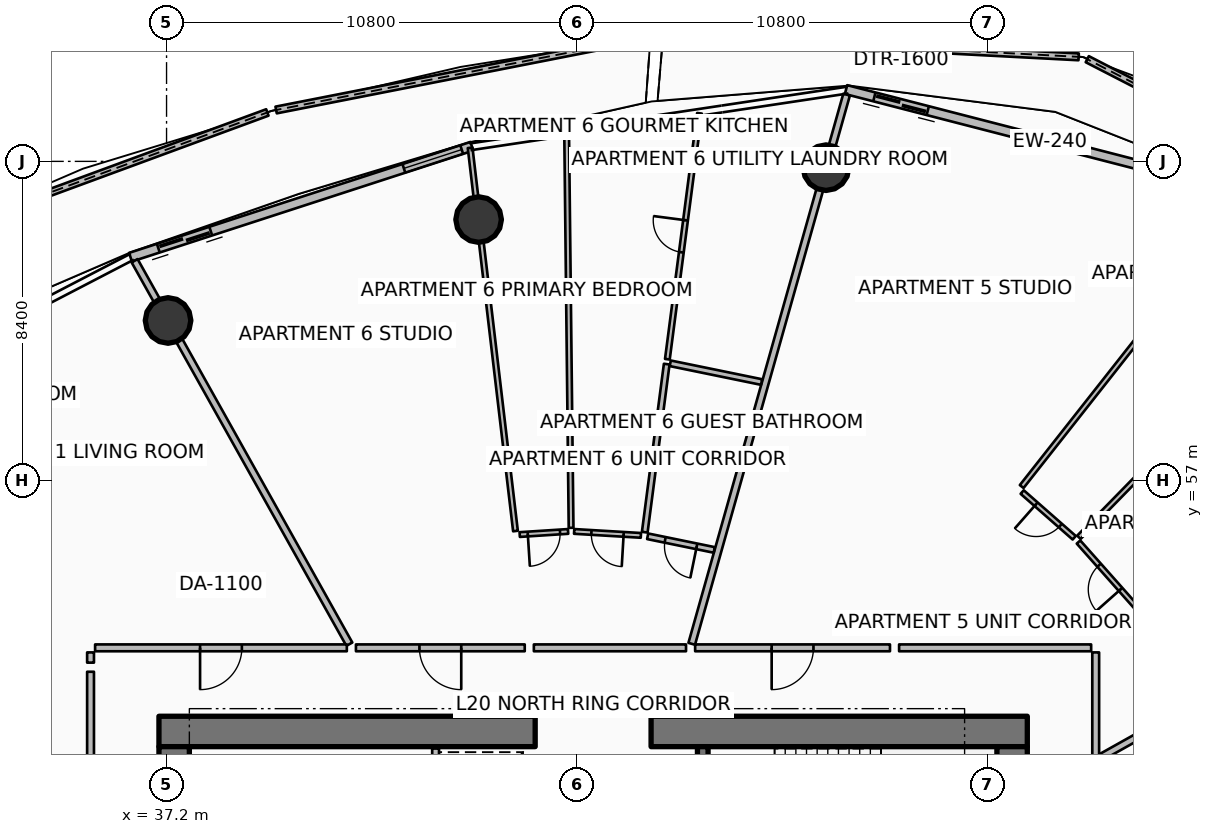
"""IFC4 building model, lengths in metres.
Left out: names, types, materials, properties, quantities, classifications, styles, units other than length and angle.
Written with IfcOpenShell. Run it as: python <this file> out.ifc"""

import sys

from ifc_helpers import new_model, si_unit, direction, frame, frame_2d, origin, origin_2d, place, context, subcontext, project, spatial, polyline, rectangle, circle, outline, extrude, element, fill, save


model = new_model("IFC4")
c1 = context("Model", 3, precision=1e-05, world=origin(), true_north=direction((0.0, 1.0)))
c2 = subcontext(c1, "Body", "Model", "MODEL_VIEW")
j1 = project(units=[si_unit("LENGTHUNIT", "METRE"), si_unit("PLANEANGLEUNIT", "RADIAN")], contexts=[c1])
p1 = place(None, origin())
s1 = spatial("IfcSite", under=j1, at=p1, CompositionType="ELEMENT")
p2 = place(p1, origin())
s2 = spatial("IfcBuilding", under=s1, at=p2, CompositionType="ELEMENT")
p3 = place(p2, frame((0.0, 0.0, 82.65)))
s3 = spatial("IfcBuildingStorey", under=s2, at=p3, CompositionType="ELEMENT", Elevation=82.65)
p4 = place(p3, frame((37.0, 50.4, 0.0), z_axis=(0.0, 0.0, 1.0), x_axis=(1.0, 0.0, 0.0)))
e1 = element("IfcWall", 1, at=p4, inside=s3, PredefinedType="SHEAR", context=c2, shape_type="SweptSolid", body=[
    extrude(rectangle(XDim=9.9, YDim=0.8, at=frame_2d((4.95, 0.0))), origin(), (0.0, 0.0, 1.0), 3.75),
])
p5 = place(p3, frame((49.95, 50.4, 0.0), z_axis=(0.0, 0.0, 1.0), x_axis=(1.0, 0.0, 0.0)))
e2 = element("IfcWall", 2, at=p5, inside=s3, PredefinedType="SHEAR", context=c2, shape_type="SweptSolid", body=[
    extrude(rectangle(XDim=9.9, YDim=0.8, at=frame_2d((4.95, 0.0))), origin(), (0.0, 0.0, 1.0), 3.75),
])
for number, where, z_axis, x_axis in (
    (3, (37.4, 34.0, 0.0), (0.0, 0.0, 1.0), (0.0, 1.0, 0.0)),
    (4, (59.45, 34.0, 0.0), (0.0, 0.0, 1.0), (0.0, 1.0, 0.0)),
):
    element("IfcWall", number, at=place(p3, frame(where, z_axis=z_axis, x_axis=x_axis)), inside=s3, PredefinedType="SHEAR", context=c2, shape_type="SweptSolid", body=[
        extrude(rectangle(XDim=16.0, YDim=0.8, at=frame_2d((8.0, 0.0))), origin(), (0.0, 0.0, 1.0), 3.75),
    ])
p6 = place(p3, frame((51.31, 46.5, 0.0), z_axis=(0.0, 0.0, 1.0), x_axis=(0.0, 1.0, 0.0)))
e5 = element("IfcWall", 5, at=p6, inside=s3, PredefinedType="SHEAR", context=c2, shape_type="SweptSolid", body=[
    extrude(rectangle(XDim=3.5, YDim=0.28, at=frame_2d((1.75, 0.0))), origin(), (0.0, 0.0, 1.0), 3.75),
])
for number, where, z_axis, x_axis in (
    (6, (54.553, 65.234, 0.0), (0.0, 0.0, 1.0), (1.0, 0.0, 0.0)),
    (7, (45.412, 63.869, 0.0), (0.0, 0.0, 1.0), (1.0, 0.0, 0.0)),
    (8, (37.24, 61.214, 0.0), (0.0, 0.0, 1.0), (1.0, 0.0, 0.0)),
):
    element("IfcColumn", number, at=place(p3, frame(where, z_axis=z_axis, x_axis=x_axis)), inside=s3, PredefinedType="COLUMN", context=c2, shape_type="SweptSolid", body=[
        extrude(circle(Radius=0.6, at=origin_2d()), origin(), (0.0, 0.0, 1.0), 3.5),
    ])
p7 = place(p3, frame((71.92, 62.684, 0.0), z_axis=(0.0, 0.0, 1.0), x_axis=(-0.888984508261, 0.457937270892, 0.0)))
e9 = element("IfcWall", 9, at=p7, inside=s3, PredefinedType="PARAPET", context=c2, shape_type="SweptSolid", body=[
    extrude(outline(polyline([(0.0, 0.0), (11.803, 0.0), (11.803, 1.148), (5.902, 1.284), (0.0, 1.483), (0.0, 0.0)])), frame((0.0, 0.09, 0.0), z_axis=(0.0, -1.0, 0.0), x_axis=(1.0, 0.0, 0.0)), (0.0, 0.0, 1.0), 0.18),
])
p8 = place(p3, frame((61.201, 68.15, 0.0), z_axis=(0.0, 0.0, 1.0), x_axis=(-0.998637836961, 0.052177299569, 0.0)))
e10 = element("IfcWall", 10, at=p8, inside=s3, PredefinedType="PARAPET", context=c2, shape_type="SweptSolid", body=[
    extrude(outline(polyline([(0.0, 0.0), (10.949, 0.0), (10.949, 1.224), (5.474, 1.127), (0.0, 1.148), (0.0, 0.0)])), frame((0.0, 0.09, 0.0), z_axis=(0.0, -1.0, 0.0), x_axis=(1.0, 0.0, 0.0)), (0.0, 0.0, 1.0), 0.18),
])
p9 = place(p3, frame((49.936, 68.686, 0.0), z_axis=(0.0, 0.0, 1.0), x_axis=(-0.98127943736, -0.192589370979, 0.0)))
e11 = element("IfcWall", 11, at=p9, inside=s3, PredefinedType="PARAPET", context=c2, shape_type="SweptSolid", body=[
    extrude(outline(polyline([(0.0, 0.0), (10.041, 0.0), (10.041, 1.632), (5.021, 1.418), (0.0, 1.233), (0.0, 0.0)])), frame((0.0, 0.09, 0.0), z_axis=(0.0, -1.0, 0.0), x_axis=(1.0, 0.0, 0.0)), (0.0, 0.0, 1.0), 0.18),
])
p10 = place(p3, frame((39.853, 66.687, 0.0), z_axis=(0.0, 0.0, 1.0), x_axis=(-0.938356460989, -0.345669136777, 0.0)))
e12 = element("IfcWall", 12, at=p10, inside=s3, PredefinedType="PARAPET", context=c2, shape_type="SweptSolid", body=[
    extrude(outline(polyline([(0.0, 0.0), (10.308, 0.0), (10.308, 1.86), (5.154, 1.798), (0.0, 1.632), (0.0, 0.0)])), frame((0.0, 0.09, 0.0), z_axis=(0.0, -1.0, 0.0), x_axis=(1.0, 0.0, 0.0)), (0.0, 0.0, 1.0), 0.18),
])
p11 = place(p3, frame((65.814, 64.523, 0.0), z_axis=(0.0, 0.0, 1.0), x_axis=(-0.968356180858, 0.249572248045, 0.0)))
e13 = element("IfcWall", 13, at=p11, inside=s3, PredefinedType="SOLIDWALL", context=c2, shape_type="SweptSolid", body=[
    extrude(rectangle(XDim=11.084, YDim=0.24, at=frame_2d((5.542, 0.0))), origin(), (0.0, 0.0, 1.0), 2.45),
])
p12 = place(p11, frame((8.865, 0.0, 0.0)))
e14 = element("IfcOpeningElement", 14, at=p12, cuts=e13, PredefinedType="OPENING", context=c2, shape_type="SweptSolid", body=[
    extrude(rectangle(XDim=1.45, YDim=2.15, at=frame_2d((0.725, 1.075))), frame((0.0, 0.13, 0.0), z_axis=(0.0, -1.0, 0.0), x_axis=(1.0, 0.0, 0.0)), (0.0, 0.0, 1.0), 0.26),
])
p13 = place(p11, frame((0.28, 0.0, 0.65)))
e15 = element("IfcOpeningElement", 15, at=p13, cuts=e13, PredefinedType="OPENING", context=c2, shape_type="SweptSolid", body=[
    extrude(rectangle(XDim=1.6, YDim=1.5, at=frame_2d((0.8, 0.75))), frame((0.0, 0.13, 0.0), z_axis=(0.0, -1.0, 0.0), x_axis=(1.0, 0.0, 0.0)), (0.0, 0.0, 1.0), 0.26),
])
p14 = place(p3, frame((45.233, 65.797, 0.0), z_axis=(0.0, 0.0, 1.0), x_axis=(-0.951052494852, -0.30902937083, 0.0)))
e16 = element("IfcWall", 16, at=p14, inside=s3, PredefinedType="SOLIDWALL", context=c2, shape_type="SweptSolid", body=[
    extrude(rectangle(XDim=9.444, YDim=0.24, at=frame_2d((4.722, 0.0))), origin(), (0.0, 0.0, 1.0), 2.45),
])
p15 = place(p14, frame((7.224, 0.0, 0.0)))
e17 = element("IfcOpeningElement", 17, at=p15, cuts=e16, PredefinedType="OPENING", context=c2, shape_type="SweptSolid", body=[
    extrude(rectangle(XDim=1.45, YDim=2.15, at=frame_2d((0.725, 1.075))), frame((0.0, 0.13, 0.0), z_axis=(0.0, -1.0, 0.0), x_axis=(1.0, 0.0, 0.0)), (0.0, 0.0, 1.0), 0.26),
])
p16 = place(p14, frame((0.28, 0.0, 0.65)))
e18 = element("IfcOpeningElement", 18, at=p16, cuts=e16, PredefinedType="OPENING", context=c2, shape_type="SweptSolid", body=[
    extrude(rectangle(XDim=1.6, YDim=1.5, at=frame_2d((0.8, 0.75))), frame((0.0, 0.13, 0.0), z_axis=(0.0, -1.0, 0.0), x_axis=(1.0, 0.0, 0.0)), (0.0, 0.0, 1.0), 0.26),
])
p17 = place(p3, frame((44.28, 47.82, 0.0), z_axis=(0.0, 0.0, 1.0), x_axis=(0.0, 1.0, 0.0)))
e19 = element("IfcWall", 19, at=p17, inside=s3, PredefinedType="PARTITIONING", context=c2, shape_type="SweptSolid", body=[
    extrude(rectangle(XDim=2.13, YDim=0.18, at=frame_2d((1.065, 0.0))), origin(), (0.0, 0.0, 1.0), 3.5),
])
p18 = place(p3, frame((61.746, 49.698, 0.0), z_axis=(0.0, 0.0, 1.0), x_axis=(0.872489938668, 0.488632077256, 0.0)))
e20 = element("IfcWall", 20, at=p18, inside=s3, PredefinedType="PARTITIONING", context=c2, shape_type="SweptSolid", body=[
    extrude(rectangle(XDim=13.725, YDim=0.18, at=frame_2d((6.862, 0.0))), origin(), (0.0, 0.0, 1.0), 2.94),
])
p19 = place(p3, frame((51.019, 52.706, 0.0), z_axis=(0.0, 0.0, 1.0), x_axis=(0.271450895995, 0.962452290279, 0.0)))
e21 = element("IfcWall", 21, at=p19, inside=s3, PredefinedType="PARTITIONING", context=c2, shape_type="SweptSolid", body=[
    extrude(rectangle(XDim=15.014, YDim=0.18, at=frame_2d((7.507, 0.0))), origin(), (0.0, 0.0, 1.0), 2.94),
])
p20 = place(p3, frame((42.01, 52.696, 0.0), z_axis=(0.0, 0.0, 1.0), x_axis=(-0.488628442553, 0.872491974249, 0.0)))
e22 = element("IfcWall", 22, at=p20, inside=s3, PredefinedType="PARTITIONING", context=c2, shape_type="SweptSolid", body=[
    extrude(rectangle(XDim=11.563, YDim=0.18, at=frame_2d((5.782, 0.0))), origin(), (0.0, 0.0, 1.0), 2.94),
])
p21 = place(p3, frame((41.944, 52.6, 0.0), z_axis=(0.0, 0.0, 1.0), x_axis=(-1.0, 0.0, 0.0)))
e23 = element("IfcWall", 23, at=p21, inside=s3, PredefinedType="PARTITIONING", context=c2, shape_type="SweptSolid", body=[
    extrude(rectangle(XDim=6.624, YDim=0.18, at=frame_2d((3.312, 0.0))), origin(), (0.0, 0.0, 1.0), 2.94),
])
p22 = place(p21, frame((2.762, 0.0, 0.0)))
e24 = element("IfcOpeningElement", 24, at=p22, cuts=e23, PredefinedType="OPENING", context=c2, shape_type="SweptSolid", body=[
    extrude(rectangle(XDim=1.1, YDim=2.1, at=frame_2d((0.55, 1.05))), frame((0.0, 0.1, 0.0), z_axis=(0.0, -1.0, 0.0), x_axis=(1.0, 0.0, 0.0)), (0.0, 0.0, 1.0), 0.2),
])
p23 = place(p3, frame((35.2, 52.48, 0.0), z_axis=(0.0, 0.0, 1.0), x_axis=(0.0, -1.0, 0.0)))
e25 = element("IfcWall", 25, at=p23, inside=s3, PredefinedType="PARTITIONING", context=c2, shape_type="SweptSolid", body=[
    extrude(rectangle(XDim=0.269, YDim=0.18, at=frame_2d((0.135, 0.0))), origin(), (0.0, 0.0, 1.0), 2.94),
])
p24 = place(p3, frame((35.2, 51.971, 0.0), z_axis=(0.0, 0.0, 1.0), x_axis=(0.0, -1.0, 0.0)))
e26 = element("IfcWall", 26, at=p24, inside=s3, PredefinedType="PARTITIONING", context=c2, shape_type="SweptSolid", body=[
    extrude(rectangle(XDim=6.241, YDim=0.18, at=frame_2d((3.12, 0.0))), origin(), (0.0, 0.0, 1.0), 2.94),
])
p25 = place(p3, frame((56.236, 52.6, 0.0), z_axis=(0.0, 0.0, 1.0), x_axis=(-1.0, 0.0, 0.0)))
e27 = element("IfcWall", 27, at=p25, inside=s3, PredefinedType="PARTITIONING", context=c2, shape_type="SweptSolid", body=[
    extrude(rectangle(XDim=5.127, YDim=0.18, at=frame_2d((2.563, 0.0))), origin(), (0.0, 0.0, 1.0), 2.94),
])
p26 = place(p25, frame((2.013, 0.0, 0.0)))
e28 = element("IfcOpeningElement", 28, at=p26, cuts=e27, PredefinedType="OPENING", context=c2, shape_type="SweptSolid", body=[
    extrude(rectangle(XDim=1.1, YDim=2.1, at=frame_2d((0.55, 1.05))), frame((0.0, 0.1, 0.0), z_axis=(0.0, -1.0, 0.0), x_axis=(1.0, 0.0, 0.0)), (0.0, 0.0, 1.0), 0.2),
])
p27 = place(p3, frame((61.65, 49.764, 0.0), z_axis=(0.0, 0.0, 1.0), x_axis=(0.0, 1.0, 0.0)))
e29 = element("IfcWall", 29, at=p27, inside=s3, PredefinedType="PARTITIONING", context=c2, shape_type="SweptSolid", body=[
    extrude(rectangle(XDim=2.716, YDim=0.18, at=frame_2d((1.358, 0.0))), origin(), (0.0, 0.0, 1.0), 2.94),
])
p28 = place(p3, frame((61.53, 52.6, 0.0), z_axis=(0.0, 0.0, 1.0), x_axis=(-1.0, 0.0, 0.0)))
e30 = element("IfcWall", 30, at=p28, inside=s3, PredefinedType="PARTITIONING", context=c2, shape_type="SweptSolid", body=[
    extrude(rectangle(XDim=5.054, YDim=0.18, at=frame_2d((2.527, 0.0))), origin(), (0.0, 0.0, 1.0), 2.94),
])
p29 = place(p3, frame((59.702, 56.844, 0.0), z_axis=(0.0, 0.0, 1.0), x_axis=(0.619083405129, 0.785325243128, 0.0)))
e31 = element("IfcWall", 31, at=p29, inside=s3, PredefinedType="PARTITIONING", context=c2, shape_type="SweptSolid", body=[
    extrude(rectangle(XDim=9.769, YDim=0.125, at=frame_2d((4.885, 0.0))), origin(), (0.0, 0.0, 1.0), 2.94),
])
p30 = place(p3, frame((61.208, 55.508, 0.0), z_axis=(0.0, 0.0, 1.0), x_axis=(0.699096858951, 0.715026979774, 0.0)))
e32 = element("IfcWall", 32, at=p30, inside=s3, PredefinedType="PARTITIONING", context=c2, shape_type="SweptSolid", body=[
    extrude(rectangle(XDim=9.747, YDim=0.125, at=frame_2d((4.874, 0.0))), origin(), (0.0, 0.0, 1.0), 2.94),
])
p31 = place(p3, frame((62.846, 53.527, 0.0), z_axis=(0.0, 0.0, 1.0), x_axis=(-0.663881646848, 0.747837655497, 0.0)))
e33 = element("IfcWall", 33, at=p31, inside=s3, PredefinedType="PARTITIONING", context=c2, shape_type="SweptSolid", body=[
    extrude(rectangle(XDim=2.483, YDim=0.125, at=frame_2d((1.242, 0.0))), origin(), (0.0, 0.0, 1.0), 2.94),
])
p32 = place(p31, frame((0.817, 0.0, 0.0)))
e34 = element("IfcOpeningElement", 34, at=p32, cuts=e33, PredefinedType="OPENING", context=c2, shape_type="SweptSolid", body=[
    extrude(rectangle(XDim=0.85, YDim=2.06, at=frame_2d((0.425, 1.03))), frame((0.0, 0.073, 0.0), z_axis=(0.0, -1.0, 0.0), x_axis=(1.0, 0.0, 0.0)), (0.0, 0.0, 1.0), 0.145),
])
p33 = place(p3, frame((61.084, 55.497, 0.0), z_axis=(0.0, 0.0, 1.0), x_axis=(-0.75124742024, 0.660020691784, 0.0)))
e35 = element("IfcWall", 35, at=p33, inside=s3, PredefinedType="PARTITIONING", context=c2, shape_type="SweptSolid", body=[
    extrude(rectangle(XDim=1.823, YDim=0.125, at=frame_2d((0.911, 0.0))), origin(), (0.0, 0.0, 1.0), 2.94),
])
p34 = place(p33, frame((0.486, 0.0, 0.0)))
e36 = element("IfcOpeningElement", 36, at=p34, cuts=e35, PredefinedType="OPENING", context=c2, shape_type="SweptSolid", body=[
    extrude(rectangle(XDim=0.85, YDim=2.06, at=frame_2d((0.425, 1.03))), frame((0.0, 0.073, 0.0), z_axis=(0.0, -1.0, 0.0), x_axis=(1.0, 0.0, 0.0)), (0.0, 0.0, 1.0), 0.145),
])
p35 = place(p3, frame((46.625, 52.6, 0.0), z_axis=(0.0, 0.0, 1.0), x_axis=(-1.0, 0.0, 0.0)))
e37 = element("IfcWall", 37, at=p35, inside=s3, PredefinedType="PARTITIONING", context=c2, shape_type="SweptSolid", body=[
    extrude(rectangle(XDim=4.442, YDim=0.18, at=frame_2d((2.221, 0.0))), origin(), (0.0, 0.0, 1.0), 2.94),
])
p36 = place(p35, frame((1.671, 0.0, 0.0)))
e38 = element("IfcOpeningElement", 38, at=p36, cuts=e37, PredefinedType="OPENING", context=c2, shape_type="SweptSolid", body=[
    extrude(rectangle(XDim=1.1, YDim=2.1, at=frame_2d((0.55, 1.05))), frame((0.0, 0.1, 0.0), z_axis=(0.0, -1.0, 0.0), x_axis=(1.0, 0.0, 0.0)), (0.0, 0.0, 1.0), 0.2),
])
p37 = place(p3, frame((50.869, 52.6, 0.0), z_axis=(0.0, 0.0, 1.0), x_axis=(-1.0, 0.0, 0.0)))
e39 = element("IfcWall", 39, at=p37, inside=s3, PredefinedType="PARTITIONING", context=c2, shape_type="SweptSolid", body=[
    extrude(rectangle(XDim=4.004, YDim=0.18, at=frame_2d((2.002, 0.0))), origin(), (0.0, 0.0, 1.0), 2.94),
])
p38 = place(p3, frame((46.382, 55.674, 0.0), z_axis=(0.0, 0.0, 1.0), x_axis=(-0.117533197276, 0.99306895407, 0.0)))
e40 = element("IfcWall", 40, at=p38, inside=s3, PredefinedType="PARTITIONING", context=c2, shape_type="SweptSolid", body=[
    extrude(rectangle(XDim=10.153, YDim=0.125, at=frame_2d((5.077, 0.0))), origin(), (0.0, 0.0, 1.0), 2.94),
])
p39 = place(p3, frame((51.612, 55.176, 0.0), z_axis=(0.0, 0.0, 1.0), x_axis=(-0.979559973395, 0.201152326663, 0.0)))
e41 = element("IfcWall", 41, at=p39, inside=s3, PredefinedType="PARTITIONING", context=c2, shape_type="SweptSolid", body=[
    extrude(rectangle(XDim=1.789, YDim=0.15, at=frame_2d((0.895, 0.0))), origin(), (0.0, 0.0, 1.0), 2.94),
])
p40 = place(p39, frame((0.469, 0.0, 0.0)))
e42 = element("IfcOpeningElement", 42, at=p40, cuts=e41, PredefinedType="OPENING", context=c2, shape_type="SweptSolid", body=[
    extrude(rectangle(XDim=0.85, YDim=2.06, at=frame_2d((0.425, 1.03))), frame((0.0, 0.085, 0.0), z_axis=(0.0, -1.0, 0.0), x_axis=(1.0, 0.0, 0.0)), (0.0, 0.0, 1.0), 0.17),
])
p41 = place(p3, frame((52.858, 59.594, 0.0), z_axis=(0.0, 0.0, 1.0), x_axis=(-0.979569035828, 0.201108189903, 0.0)))
e43 = element("IfcWall", 43, at=p41, inside=s3, PredefinedType="PARTITIONING", context=c2, shape_type="SweptSolid", body=[
    extrude(rectangle(XDim=2.453, YDim=0.15, at=frame_2d((1.227, 0.0))), origin(), (0.0, 0.0, 1.0), 2.94),
])
p42 = place(p3, frame((49.783, 55.643, 0.0), z_axis=(0.0, 0.0, 1.0), x_axis=(0.129624682181, 0.991563130501, 0.0)))
e44 = element("IfcWall", 44, at=p42, inside=s3, PredefinedType="PARTITIONING", context=c2, shape_type="SweptSolid", body=[
    extrude(rectangle(XDim=4.46, YDim=0.15, at=frame_2d((2.23, 0.0))), origin(), (0.0, 0.0, 1.0), 2.94),
])
p43 = place(p3, frame((50.378, 60.194, 0.0), z_axis=(0.0, 0.0, 1.0), x_axis=(0.129622249643, 0.991563448498, 0.0)))
e45 = element("IfcWall", 45, at=p43, inside=s3, PredefinedType="PARTITIONING", context=c2, shape_type="SweptSolid", body=[
    extrude(rectangle(XDim=6.526, YDim=0.125, at=frame_2d((3.263, 0.0))), origin(), (0.0, 0.0, 1.0), 2.94),
])
p44 = place(p43, frame((2.838, 0.0, 0.0)))
e46 = element("IfcOpeningElement", 46, at=p44, cuts=e45, PredefinedType="OPENING", context=c2, shape_type="SweptSolid", body=[
    extrude(rectangle(XDim=0.85, YDim=2.06, at=frame_2d((0.425, 1.03))), frame((0.0, 0.073, 0.0), z_axis=(0.0, -1.0, 0.0), x_axis=(1.0, 0.0, 0.0)), (0.0, 0.0, 1.0), 0.145),
])
p45 = place(p3, frame((47.845, 55.758, 0.0), z_axis=(0.0, 0.0, 1.0), x_axis=(-0.011264572172, 0.999936552694, 0.0)))
e47 = element("IfcWall", 47, at=p45, inside=s3, PredefinedType="PARTITIONING", context=c2, shape_type="SweptSolid", body=[
    extrude(rectangle(XDim=10.382, YDim=0.125, at=frame_2d((5.191, 0.0))), origin(), (0.0, 0.0, 1.0), 2.94),
])
p46 = place(p3, frame((49.682, 55.559, 0.0), z_axis=(0.0, 0.0, 1.0), x_axis=(-0.99824215698, 0.059267158097, 0.0)))
e48 = element("IfcWall", 48, at=p46, inside=s3, PredefinedType="PARTITIONING", context=c2, shape_type="SweptSolid", body=[
    extrude(rectangle(XDim=1.759, YDim=0.125, at=frame_2d((0.879, 0.0))), origin(), (0.0, 0.0, 1.0), 2.94),
])
p47 = place(p46, frame((0.455, 0.0, 0.0)))
e49 = element("IfcOpeningElement", 49, at=p47, cuts=e48, PredefinedType="OPENING", context=c2, shape_type="SweptSolid", body=[
    extrude(rectangle(XDim=0.85, YDim=2.06, at=frame_2d((0.425, 1.03))), frame((0.0, 0.073, 0.0), z_axis=(0.0, -1.0, 0.0), x_axis=(1.0, 0.0, 0.0)), (0.0, 0.0, 1.0), 0.145),
])
p48 = place(p3, frame((47.766, 55.663, 0.0), z_axis=(0.0, 0.0, 1.0), x_axis=(-0.997930857608, -0.064296216329, 0.0)))
e50 = element("IfcWall", 50, at=p48, inside=s3, PredefinedType="PARTITIONING", context=c2, shape_type="SweptSolid", body=[
    extrude(rectangle(XDim=1.276, YDim=0.125, at=frame_2d((0.638, 0.0))), origin(), (0.0, 0.0, 1.0), 2.94),
])
p49 = place(p48, frame((0.213, 0.0, 0.0)))
e51 = element("IfcOpeningElement", 51, at=p49, cuts=e50, PredefinedType="OPENING", context=c2, shape_type="SweptSolid", body=[
    extrude(rectangle(XDim=0.85, YDim=2.06, at=frame_2d((0.425, 1.03))), frame((0.0, 0.073, 0.0), z_axis=(0.0, -1.0, 0.0), x_axis=(1.0, 0.0, 0.0)), (0.0, 0.0, 1.0), 0.145),
])
p50 = place(p12, origin())
e52 = element("IfcDoor", 52, at=p50, inside=s3, OperationType="DOUBLE_DOOR_SLIDING", PredefinedType="DOOR", context=c2, shape_type="SweptSolid", body=[
    extrude(rectangle(XDim=1.45, YDim=2.15, at=frame_2d((0.725, 1.075))), frame((0.0, 0.025, 0.0), z_axis=(0.0, -1.0, 0.0), x_axis=(1.0, 0.0, 0.0)), (0.0, 0.0, 1.0), 0.05),
])
fill(e14, e52)
p51 = place(p15, origin())
e53 = element("IfcDoor", 53, at=p51, inside=s3, OperationType="DOUBLE_DOOR_SLIDING", PredefinedType="DOOR", context=c2, shape_type="SweptSolid", body=[
    extrude(rectangle(XDim=1.45, YDim=2.15, at=frame_2d((0.725, 1.075))), frame((0.0, 0.025, 0.0), z_axis=(0.0, -1.0, 0.0), x_axis=(1.0, 0.0, 0.0)), (0.0, 0.0, 1.0), 0.05),
])
fill(e17, e53)
p52 = place(p16, origin())
e54 = element("IfcWindow", 54, at=p52, inside=s3, PartitioningType="SINGLE_PANEL", PredefinedType="WINDOW", context=c2, shape_type="SweptSolid", body=[
    extrude(rectangle(XDim=1.6, YDim=1.5, at=frame_2d((0.8, 0.75))), frame((0.0, 0.03, 0.0), z_axis=(0.0, -1.0, 0.0), x_axis=(1.0, 0.0, 0.0)), (0.0, 0.0, 1.0), 0.06),
])
fill(e18, e54)
p53 = place(p22, origin())
e55 = element("IfcDoor", 55, at=p53, inside=s3, OperationType="SINGLE_SWING_RIGHT", PredefinedType="DOOR", context=c2, shape_type="SweptSolid", body=[
    extrude(rectangle(XDim=1.1, YDim=2.1, at=frame_2d((0.55, 1.05))), frame((0.0, 0.025, 0.0), z_axis=(0.0, -1.0, 0.0), x_axis=(1.0, 0.0, 0.0)), (0.0, 0.0, 1.0), 0.05),
])
fill(e24, e55)
p54 = place(p26, origin())
e56 = element("IfcDoor", 56, at=p54, inside=s3, OperationType="SINGLE_SWING_RIGHT", PredefinedType="DOOR", context=c2, shape_type="SweptSolid", body=[
    extrude(rectangle(XDim=1.1, YDim=2.1, at=frame_2d((0.55, 1.05))), frame((0.0, 0.025, 0.0), z_axis=(0.0, -1.0, 0.0), x_axis=(1.0, 0.0, 0.0)), (0.0, 0.0, 1.0), 0.05),
])
fill(e28, e56)
p55 = place(p32, origin())
e57 = element("IfcDoor", 57, at=p55, inside=s3, OperationType="SINGLE_SWING_LEFT", PredefinedType="DOOR", context=c2, shape_type="SweptSolid", body=[
    extrude(rectangle(XDim=0.85, YDim=2.06, at=frame_2d((0.425, 1.03))), frame((0.0, 0.025, 0.0), z_axis=(0.0, -1.0, 0.0), x_axis=(1.0, 0.0, 0.0)), (0.0, 0.0, 1.0), 0.05),
])
fill(e34, e57)
p56 = place(p34, origin())
e58 = element("IfcDoor", 58, at=p56, inside=s3, OperationType="SINGLE_SWING_RIGHT", PredefinedType="DOOR", context=c2, shape_type="SweptSolid", body=[
    extrude(rectangle(XDim=0.85, YDim=2.06, at=frame_2d((0.425, 1.03))), frame((0.0, 0.025, 0.0), z_axis=(0.0, -1.0, 0.0), x_axis=(1.0, 0.0, 0.0)), (0.0, 0.0, 1.0), 0.05),
])
fill(e36, e58)
p57 = place(p36, origin())
e59 = element("IfcDoor", 59, at=p57, inside=s3, OperationType="SINGLE_SWING_LEFT", PredefinedType="DOOR", context=c2, shape_type="SweptSolid", body=[
    extrude(rectangle(XDim=1.1, YDim=2.1, at=frame_2d((0.55, 1.05))), frame((0.0, 0.025, 0.0), z_axis=(0.0, -1.0, 0.0), x_axis=(1.0, 0.0, 0.0)), (0.0, 0.0, 1.0), 0.05),
])
fill(e38, e59)
p58 = place(p40, origin())
e60 = element("IfcDoor", 60, at=p58, inside=s3, OperationType="SINGLE_SWING_LEFT", PredefinedType="DOOR", context=c2, shape_type="SweptSolid", body=[
    extrude(rectangle(XDim=0.85, YDim=2.06, at=frame_2d((0.425, 1.03))), frame((0.0, 0.025, 0.0), z_axis=(0.0, -1.0, 0.0), x_axis=(1.0, 0.0, 0.0)), (0.0, 0.0, 1.0), 0.05),
])
fill(e42, e60)
p59 = place(p44, origin())
e61 = element("IfcDoor", 61, at=p59, inside=s3, OperationType="SINGLE_SWING_RIGHT", PredefinedType="DOOR", context=c2, shape_type="SweptSolid", body=[
    extrude(rectangle(XDim=0.85, YDim=2.06, at=frame_2d((0.425, 1.03))), frame((0.0, 0.025, 0.0), z_axis=(0.0, -1.0, 0.0), x_axis=(1.0, 0.0, 0.0)), (0.0, 0.0, 1.0), 0.05),
])
fill(e46, e61)
p60 = place(p47, origin())
e62 = element("IfcDoor", 62, at=p60, inside=s3, OperationType="SINGLE_SWING_LEFT", PredefinedType="DOOR", context=c2, shape_type="SweptSolid", body=[
    extrude(rectangle(XDim=0.85, YDim=2.06, at=frame_2d((0.425, 1.03))), frame((0.0, 0.025, 0.0), z_axis=(0.0, -1.0, 0.0), x_axis=(1.0, 0.0, 0.0)), (0.0, 0.0, 1.0), 0.05),
])
fill(e49, e62)
p61 = place(p49, origin())
e63 = element("IfcDoor", 63, at=p61, inside=s3, OperationType="SINGLE_SWING_RIGHT", PredefinedType="DOOR", context=c2, shape_type="SweptSolid", body=[
    extrude(rectangle(XDim=0.85, YDim=2.06, at=frame_2d((0.425, 1.03))), frame((0.0, 0.025, 0.0), z_axis=(0.0, -1.0, 0.0), x_axis=(1.0, 0.0, 0.0)), (0.0, 0.0, 1.0), 0.05),
])
fill(e51, e63)
save(model, sys.argv[1])
